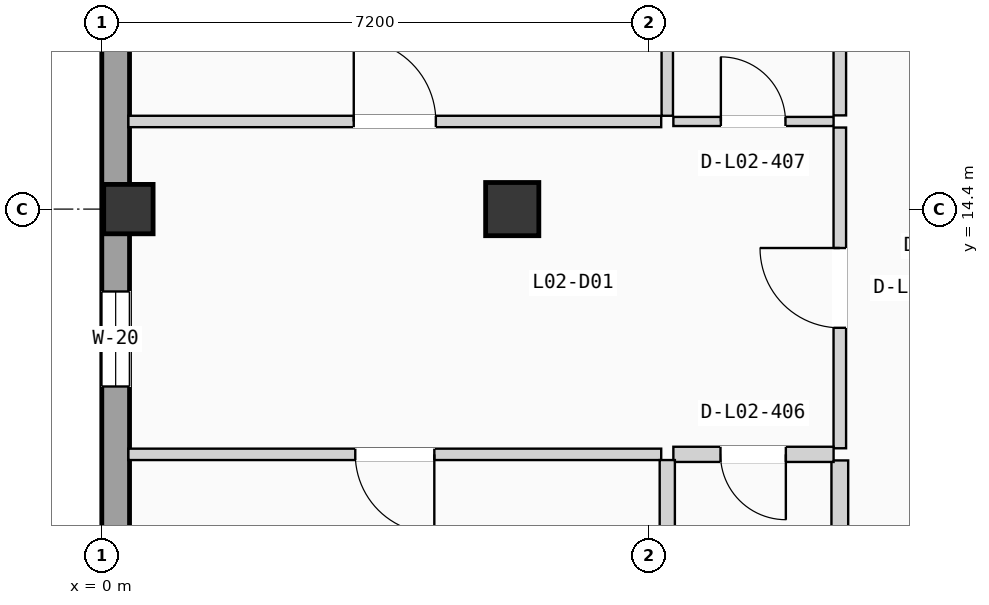
"""IFC4 building model, lengths in metres.
Left out: names, types, materials, properties, quantities, classifications, styles, units other than length and angle.
Written with IfcOpenShell. Run it as: python <this file> out.ifc"""

import sys

from ifc_helpers import new_model, si_unit, direction, frame, frame_2d, origin, origin_2d, place, context, subcontext, project, spatial, rectangle, extrude, element, fill, save


model = new_model("IFC4")
c1 = context("Model", 3, precision=1e-05, world=origin(), true_north=direction((0.0, 1.0)))
c2 = subcontext(c1, "Body", "Model", "MODEL_VIEW")
j1 = project(units=[si_unit("LENGTHUNIT", "METRE"), si_unit("PLANEANGLEUNIT", "RADIAN")], contexts=[c1])
p1 = place(None, origin())
s1 = spatial("IfcSite", under=j1, at=p1, CompositionType="ELEMENT")
p2 = place(p1, origin())
s2 = spatial("IfcBuilding", under=s1, at=p2, CompositionType="ELEMENT")
p3 = place(p2, frame((0.0, 0.0, 8.575)))
s3 = spatial("IfcBuildingStorey", under=s2, at=p3, CompositionType="ELEMENT", Elevation=8.575)
p4 = place(p3, frame((0.35, 14.4, 0.0), z_axis=(0.0, 0.0, 1.0), x_axis=(1.0, 0.0, 0.0)))
e1 = element("IfcColumn", 1, at=p4, inside=s3, PredefinedType="COLUMN", context=c2, shape_type="SweptSolid", body=[
    extrude(rectangle(XDim=0.65, YDim=0.65, at=origin_2d()), origin(), (0.0, 0.0, 1.0), 3.5),
])
p5 = place(p3, frame((5.4, 14.4, 0.0), z_axis=(0.0, 0.0, 1.0), x_axis=(1.0, 0.0, 0.0)))
e2 = element("IfcColumn", 2, at=p5, inside=s3, PredefinedType="COLUMN", context=c2, shape_type="SweptSolid", body=[
    extrude(rectangle(XDim=0.7, YDim=0.7, at=origin_2d()), origin(), (0.0, 0.0, 1.0), 3.5),
])
p6 = place(p3, frame((0.183, 0.365, 0.0), z_axis=(0.0, 0.0, 1.0), x_axis=(0.0, 1.0, 0.0)))
e3 = element("IfcWall", 3, at=p6, inside=s3, PredefinedType="SOLIDWALL", context=c2, shape_type="SweptSolid", body=[
    extrude(rectangle(XDim=49.67, YDim=0.365, at=frame_2d((24.835, 0.0))), origin(), (0.0, 0.0, 1.0), 3.24),
])
p7 = place(p6, frame((11.701, 0.0, 0.755)))
e4 = element("IfcOpeningElement", 4, at=p7, cuts=e3, PredefinedType="OPENING", context=c2, shape_type="SweptSolid", body=[
    extrude(rectangle(XDim=1.25, YDim=1.8, at=frame_2d((0.625, 0.9))), frame((0.0, 0.192, 0.0), z_axis=(0.0, -1.0, 0.0), x_axis=(1.0, 0.0, 0.0)), (0.0, 0.0, 1.0), 0.385),
])
p8 = place(p6, frame((8.306, 0.0, 0.9)))
e5 = element("IfcOpeningElement", 5, at=p8, cuts=e3, PredefinedType="OPENING", context=c2, shape_type="SweptSolid", body=[
    extrude(rectangle(XDim=1.35, YDim=1.2, at=frame_2d((0.675, 0.6))), frame((0.0, 0.192, 0.0), z_axis=(0.0, -1.0, 0.0), x_axis=(1.0, 0.0, 0.0)), (0.0, 0.0, 1.0), 0.385),
])
p9 = place(p6, frame((16.34, 0.0, 0.9)))
e6 = element("IfcOpeningElement", 6, at=p9, cuts=e3, PredefinedType="OPENING", context=c2, shape_type="SweptSolid", body=[
    extrude(rectangle(XDim=1.35, YDim=1.35, at=frame_2d((0.675, 0.675))), frame((0.0, 0.192, 0.0), z_axis=(0.0, -1.0, 0.0), x_axis=(1.0, 0.0, 0.0)), (0.0, 0.0, 1.0), 0.385),
])
p10 = place(p6, frame((24.16, 0.0, 0.9)))
e7 = element("IfcOpeningElement", 7, at=p10, cuts=e3, PredefinedType="OPENING", context=c2, shape_type="SweptSolid", body=[
    extrude(rectangle(XDim=1.35, YDim=1.5, at=frame_2d((0.675, 0.75))), frame((0.0, 0.192, 0.0), z_axis=(0.0, -1.0, 0.0), x_axis=(1.0, 0.0, 0.0)), (0.0, 0.0, 1.0), 0.385),
])
p11 = place(p6, frame((19.278, 0.0, 0.9)))
e8 = element("IfcOpeningElement", 8, at=p11, cuts=e3, PredefinedType="OPENING", context=c2, shape_type="SweptSolid", body=[
    extrude(rectangle(XDim=1.35, YDim=1.65, at=frame_2d((0.675, 0.825))), frame((0.0, 0.192, 0.0), z_axis=(0.0, -1.0, 0.0), x_axis=(1.0, 0.0, 0.0)), (0.0, 0.0, 1.0), 0.385),
])
p12 = place(p6, frame((29.042, 0.0, 0.755)))
e9 = element("IfcOpeningElement", 9, at=p12, cuts=e3, PredefinedType="OPENING", context=c2, shape_type="SweptSolid", body=[
    extrude(rectangle(XDim=1.35, YDim=1.8, at=frame_2d((0.675, 0.9))), frame((0.0, 0.192, 0.0), z_axis=(0.0, -1.0, 0.0), x_axis=(1.0, 0.0, 0.0)), (0.0, 0.0, 1.0), 0.385),
])
p13 = place(p6, frame((36.603, 0.0, 0.9)))
e10 = element("IfcOpeningElement", 10, at=p13, cuts=e3, PredefinedType="OPENING", context=c2, shape_type="SweptSolid", body=[
    extrude(rectangle(XDim=1.48, YDim=1.2, at=frame_2d((0.74, 0.6))), frame((0.0, 0.192, 0.0), z_axis=(0.0, -1.0, 0.0), x_axis=(1.0, 0.0, 0.0)), (0.0, 0.0, 1.0), 0.385),
])
p14 = place(p6, frame((31.915, 0.0, 0.9)))
e11 = element("IfcOpeningElement", 11, at=p14, cuts=e3, PredefinedType="OPENING", context=c2, shape_type="SweptSolid", body=[
    extrude(rectangle(XDim=1.48, YDim=1.35, at=frame_2d((0.74, 0.675))), frame((0.0, 0.192, 0.0), z_axis=(0.0, -1.0, 0.0), x_axis=(1.0, 0.0, 0.0)), (0.0, 0.0, 1.0), 0.385),
])
p15 = place(p6, frame((39.948, 0.0, 0.9)))
e12 = element("IfcOpeningElement", 12, at=p15, cuts=e3, PredefinedType="OPENING", context=c2, shape_type="SweptSolid", body=[
    extrude(rectangle(XDim=1.48, YDim=1.5, at=frame_2d((0.74, 0.75))), frame((0.0, 0.192, 0.0), z_axis=(0.0, -1.0, 0.0), x_axis=(1.0, 0.0, 0.0)), (0.0, 0.0, 1.0), 0.385),
])
p16 = place(p3, frame((9.71, 11.253, 0.0), z_axis=(0.0, 0.0, 1.0), x_axis=(0.0, 1.0, 0.0)))
e13 = element("IfcWall", 13, at=p16, inside=s3, PredefinedType="PARTITIONING", context=c2, shape_type="SweptSolid", body=[
    extrude(rectangle(XDim=4.22, YDim=0.165, at=frame_2d((2.11, 0.0))), origin(), (0.0, 0.0, 1.0), 3.22),
])
p17 = place(p16, frame((1.585, 0.0, 0.0)))
e14 = element("IfcOpeningElement", 14, at=p17, cuts=e13, PredefinedType="OPENING", context=c2, shape_type="SweptSolid", body=[
    extrude(rectangle(XDim=1.05, YDim=2.13, at=frame_2d((0.525, 1.065))), frame((0.0, 0.093, 0.0), z_axis=(0.0, -1.0, 0.0), x_axis=(1.0, 0.0, 0.0)), (0.0, 0.0, 1.0), 0.185),
])
p18 = place(p3, frame((9.71, 7.6, 0.0), z_axis=(0.0, 0.0, 1.0), x_axis=(0.0, 1.0, 0.0)))
e15 = element("IfcWall", 15, at=p18, inside=s3, PredefinedType="PLUMBINGWALL", context=c2, shape_type="SweptSolid", body=[
    extrude(rectangle(XDim=3.493, YDim=0.22, at=frame_2d((1.747, 0.0))), origin(), (0.0, 0.0, 1.0), 3.22),
])
p19 = place(p3, frame((9.71, 15.633, 0.0), z_axis=(0.0, 0.0, 1.0), x_axis=(0.0, 1.0, 0.0)))
e16 = element("IfcWall", 16, at=p19, inside=s3, PredefinedType="PARTITIONING", context=c2, shape_type="SweptSolid", body=[
    extrude(rectangle(XDim=3.493, YDim=0.165, at=frame_2d((1.747, 0.0))), origin(), (0.0, 0.0, 1.0), 3.22),
])
p20 = place(p3, frame((7.52, 11.173, 0.0), z_axis=(0.0, 0.0, 1.0), x_axis=(1.0, 0.0, 0.0)))
e17 = element("IfcWall", 17, at=p20, inside=s3, PredefinedType="PLUMBINGWALL", context=c2, shape_type="SweptSolid", body=[
    extrude(rectangle(XDim=2.108, YDim=0.2, at=frame_2d((1.054, 0.0))), origin(), (0.0, 0.0, 1.0), 3.22),
])
p21 = place(p20, frame((0.62, 0.0, 0.0)))
e18 = element("IfcOpeningElement", 18, at=p21, cuts=e17, PredefinedType="OPENING", context=c2, shape_type="SweptSolid", body=[
    extrude(rectangle(XDim=0.86, YDim=2.0, at=frame_2d((0.43, 1.0))), frame((0.0, 0.11, 0.0), z_axis=(0.0, -1.0, 0.0), x_axis=(1.0, 0.0, 0.0)), (0.0, 0.0, 1.0), 0.22),
])
p22 = place(p3, frame((7.52, 15.553, 0.0), z_axis=(0.0, 0.0, 1.0), x_axis=(1.0, 0.0, 0.0)))
e19 = element("IfcWall", 19, at=p22, inside=s3, PredefinedType="PARTITIONING", context=c2, shape_type="SweptSolid", body=[
    extrude(rectangle(XDim=2.108, YDim=0.12, at=frame_2d((1.054, 0.0))), origin(), (0.0, 0.0, 1.0), 3.22),
])
p23 = place(p22, frame((0.625, 0.0, 0.0)))
e20 = element("IfcOpeningElement", 20, at=p23, cuts=e19, PredefinedType="OPENING", context=c2, shape_type="SweptSolid", body=[
    extrude(rectangle(XDim=0.85, YDim=2.01, at=frame_2d((0.425, 1.005))), frame((0.0, 0.07, 0.0), z_axis=(0.0, -1.0, 0.0), x_axis=(1.0, 0.0, 0.0)), (0.0, 0.0, 1.0), 0.14),
])
p24 = place(p3, frame((0.35, 11.173, 0.0), z_axis=(0.0, 0.0, 1.0), x_axis=(1.0, 0.0, 0.0)))
e21 = element("IfcWall", 21, at=p24, inside=s3, PredefinedType="PARTITIONING", context=c2, shape_type="SweptSolid", body=[
    extrude(rectangle(XDim=7.01, YDim=0.15, at=frame_2d((3.505, 0.0))), origin(), (0.0, 0.0, 1.0), 3.22),
])
p25 = place(p24, frame((2.985, 0.0, 0.0)))
e22 = element("IfcOpeningElement", 22, at=p25, cuts=e21, PredefinedType="OPENING", context=c2, shape_type="SweptSolid", body=[
    extrude(rectangle(XDim=1.04, YDim=2.08, at=frame_2d((0.52, 1.04))), frame((0.0, 0.085, 0.0), z_axis=(0.0, -1.0, 0.0), x_axis=(1.0, 0.0, 0.0)), (0.0, 0.0, 1.0), 0.17),
])
p26 = place(p3, frame((0.35, 15.553, 0.0), z_axis=(0.0, 0.0, 1.0), x_axis=(1.0, 0.0, 0.0)))
e23 = element("IfcWall", 23, at=p26, inside=s3, PredefinedType="PARTITIONING", context=c2, shape_type="SweptSolid", body=[
    extrude(rectangle(XDim=7.01, YDim=0.15, at=frame_2d((3.505, 0.0))), origin(), (0.0, 0.0, 1.0), 3.22),
])
p27 = place(p26, frame((2.965, 0.0, 0.0)))
e24 = element("IfcOpeningElement", 24, at=p27, cuts=e23, PredefinedType="OPENING", context=c2, shape_type="SweptSolid", body=[
    extrude(rectangle(XDim=1.08, YDim=2.1, at=frame_2d((0.54, 1.05))), frame((0.0, 0.085, 0.0), z_axis=(0.0, -1.0, 0.0), x_axis=(1.0, 0.0, 0.0)), (0.0, 0.0, 1.0), 0.17),
])
p28 = place(p3, frame((7.44, 7.6, 0.0), z_axis=(0.0, 0.0, 1.0), x_axis=(0.0, 1.0, 0.0)))
e25 = element("IfcWall", 25, at=p28, inside=s3, PredefinedType="PLUMBINGWALL", context=c2, shape_type="SweptSolid", body=[
    extrude(rectangle(XDim=3.498, YDim=0.2, at=frame_2d((1.749, 0.0))), origin(), (0.0, 0.0, 1.0), 3.22),
])
p29 = place(p3, frame((7.44, 15.628, 0.0), z_axis=(0.0, 0.0, 1.0), x_axis=(0.0, 1.0, 0.0)))
e26 = element("IfcWall", 26, at=p29, inside=s3, PredefinedType="PARTITIONING", context=c2, shape_type="SweptSolid", body=[
    extrude(rectangle(XDim=3.498, YDim=0.15, at=frame_2d((1.749, 0.0))), origin(), (0.0, 0.0, 1.0), 3.22),
])
p30 = place(p7, origin())
e27 = element("IfcWindow", 27, at=p30, inside=s3, PartitioningType="SINGLE_PANEL", PredefinedType="WINDOW", context=c2, shape_type="SweptSolid", body=[
    extrude(rectangle(XDim=1.25, YDim=1.8, at=frame_2d((0.625, 0.9))), frame((0.0, 0.03, 0.0), z_axis=(0.0, -1.0, 0.0), x_axis=(1.0, 0.0, 0.0)), (0.0, 0.0, 1.0), 0.06),
])
fill(e4, e27)
p31 = place(p17, origin())
e28 = element("IfcDoor", 28, at=p31, inside=s3, OperationType="SINGLE_SWING_RIGHT", PredefinedType="DOOR", context=c2, shape_type="SweptSolid", body=[
    extrude(rectangle(XDim=1.05, YDim=2.13, at=frame_2d((0.525, 1.065))), frame((0.0, 0.025, 0.0), z_axis=(0.0, -1.0, 0.0), x_axis=(1.0, 0.0, 0.0)), (0.0, 0.0, 1.0), 0.05),
])
fill(e14, e28)
p32 = place(p21, frame((0.86, 0.0, 0.0), z_axis=(0.0, 0.0, 1.0), x_axis=(-1.0, 0.0, 0.0)))
e29 = element("IfcDoor", 29, at=p32, inside=s3, OperationType="SINGLE_SWING_RIGHT", PredefinedType="DOOR", context=c2, shape_type="SweptSolid", body=[
    extrude(rectangle(XDim=0.86, YDim=2.0, at=frame_2d((0.43, 1.0))), frame((0.0, 0.025, 0.0), z_axis=(0.0, -1.0, 0.0), x_axis=(1.0, 0.0, 0.0)), (0.0, 0.0, 1.0), 0.05),
])
fill(e18, e29)
p33 = place(p23, origin())
e30 = element("IfcDoor", 30, at=p33, inside=s3, OperationType="SINGLE_SWING_LEFT", PredefinedType="DOOR", context=c2, shape_type="SweptSolid", body=[
    extrude(rectangle(XDim=0.85, YDim=2.01, at=frame_2d((0.425, 1.005))), frame((0.0, 0.025, 0.0), z_axis=(0.0, -1.0, 0.0), x_axis=(1.0, 0.0, 0.0)), (0.0, 0.0, 1.0), 0.05),
])
fill(e20, e30)
p34 = place(p25, frame((1.04, 0.0, 0.0), z_axis=(0.0, 0.0, 1.0), x_axis=(-1.0, 0.0, 0.0)))
e31 = element("IfcDoor", 31, at=p34, inside=s3, OperationType="SINGLE_SWING_RIGHT", PredefinedType="DOOR", context=c2, shape_type="SweptSolid", body=[
    extrude(rectangle(XDim=1.04, YDim=2.08, at=frame_2d((0.52, 1.04))), frame((0.0, 0.025, 0.0), z_axis=(0.0, -1.0, 0.0), x_axis=(1.0, 0.0, 0.0)), (0.0, 0.0, 1.0), 0.05),
])
fill(e22, e31)
p35 = place(p27, origin())
e32 = element("IfcDoor", 32, at=p35, inside=s3, OperationType="SINGLE_SWING_LEFT", PredefinedType="DOOR", context=c2, shape_type="SweptSolid", body=[
    extrude(rectangle(XDim=1.08, YDim=2.1, at=frame_2d((0.54, 1.05))), frame((0.0, 0.025, 0.0), z_axis=(0.0, -1.0, 0.0), x_axis=(1.0, 0.0, 0.0)), (0.0, 0.0, 1.0), 0.05),
])
fill(e24, e32)
save(model, sys.argv[1])
